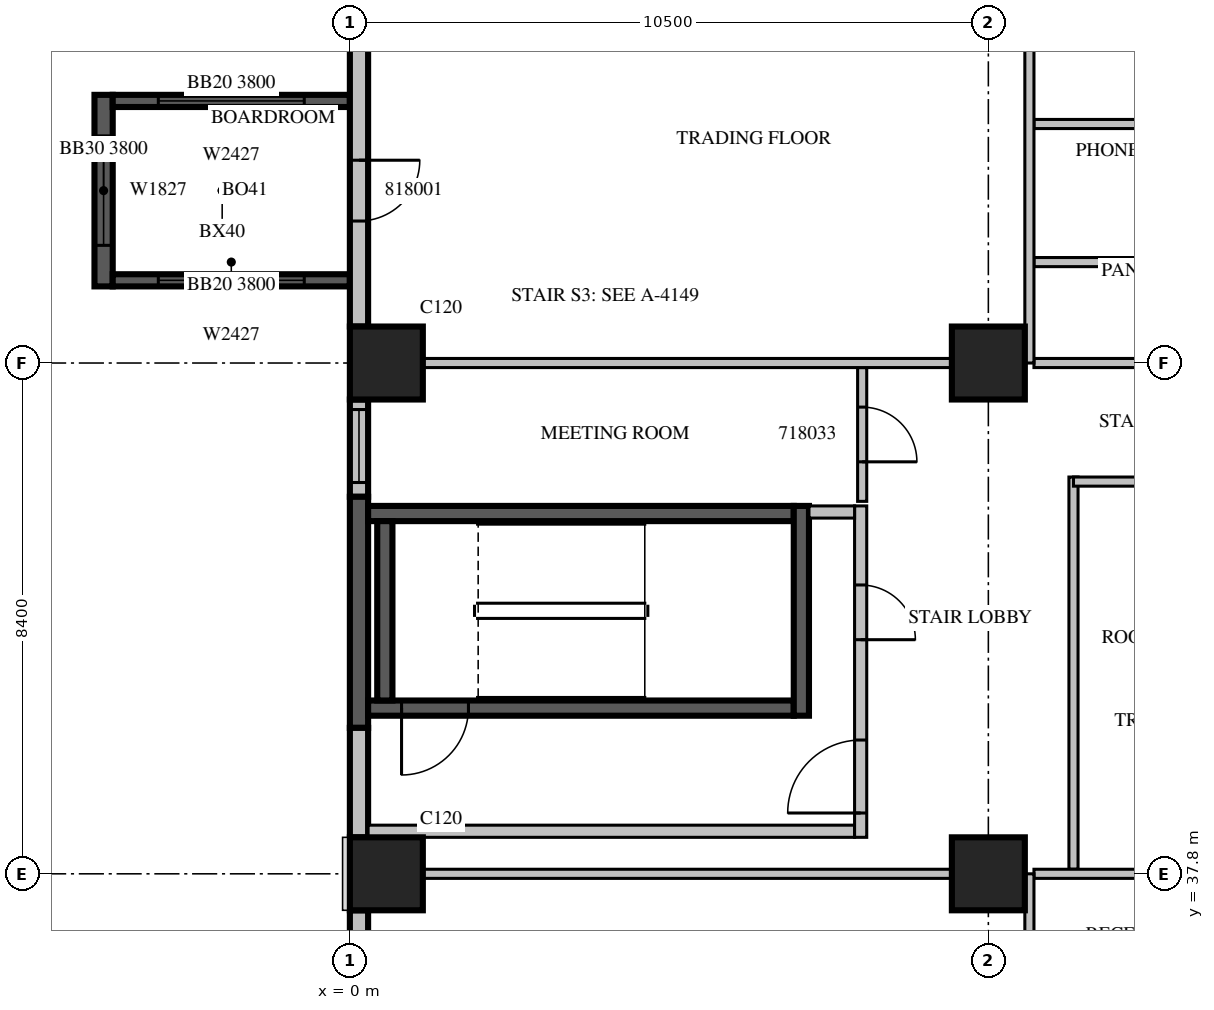
"""IFC4 building model, lengths in metres.
Left out: names, types, materials, properties, quantities, classifications, styles, units other than length and angle.
Written with IfcOpenShell. Run it as: python <this file> out.ifc"""

import sys

from ifc_helpers import new_model, si_unit, direction, frame, frame_2d, origin, origin_2d, place, context, subcontext, project, spatial, rectangle, extrude, source, transform, mapped, element, fill, save


model = new_model("IFC4")
c1 = context("Model", 3, precision=1e-05, world=origin(), true_north=direction((0.0, 1.0)))
c2 = subcontext(c1, "Body", "Model", "MODEL_VIEW")
j1 = project(units=[si_unit("LENGTHUNIT", "METRE"), si_unit("PLANEANGLEUNIT", "RADIAN")], contexts=[c1])
p1 = place(None, origin())
s1 = spatial("IfcSite", under=j1, at=p1, CompositionType="ELEMENT")
p2 = place(p1, origin())
s2 = spatial("IfcBuilding", under=s1, at=p2, CompositionType="ELEMENT")
p3 = place(p2, frame((0.0, 0.0, 86.7)))
s3 = spatial("IfcBuildingStorey", under=s2, at=p3, CompositionType="ELEMENT", Elevation=86.7)
m1 = source(origin(), c2, "Body", "SweptSolid", [
    extrude(rectangle(XDim=1.2, YDim=1.2, at=origin_2d()), origin(), (0.0, 0.0, 1.0), 4.2),
])
for number, where, z_axis, x_axis in (
    (1, (0.6, 37.8, 0.0), (0.0, 0.0, 1.0), (1.0, 0.0, 0.0)),
    (2, (10.5, 37.8, 0.0), (0.0, 0.0, 1.0), (1.0, 0.0, 0.0)),
    (3, (0.6, 46.2, 0.0), (0.0, 0.0, 1.0), (1.0, 0.0, 0.0)),
    (4, (10.5, 46.2, 0.0), (0.0, 0.0, 1.0), (1.0, 0.0, 0.0)),
):
    element("IfcColumn", number, at=place(p3, frame(where, z_axis=z_axis, x_axis=x_axis)), inside=s3, PredefinedType="COLUMN", context=c2, shape_type="MappedRepresentation", body=[
        mapped(m1, transform((0.0, 0.0, 0.0), scale=1.0)),
    ])
m2 = source(origin(), c2, "Body", "SweptSolid", [
    extrude(rectangle(XDim=3.15, YDim=0.3, at=frame_2d((1.575, 0.0))), origin(), (0.0, 0.0, 1.0), 3.8),
])
p4 = place(p3, frame((-4.05, 50.61, 0.0), z_axis=(0.0, 0.0, 1.0), x_axis=(0.0, -1.0, 0.0)))
e5 = element("IfcWall", 5, at=p4, inside=s3, PredefinedType="SOLIDWALL", context=c2, shape_type="MappedRepresentation", body=[
    mapped(m2, transform((0.0, 0.0, 0.0), scale=1.0)),
])
m3 = source(origin(), c2, "Body", "SweptSolid", [
    extrude(rectangle(XDim=1.8, YDim=2.7, at=frame_2d((0.9, 1.35))), frame((0.0, 0.16, 0.0), z_axis=(0.0, -1.0, 0.0), x_axis=(1.0, 0.0, 0.0)), (0.0, 0.0, 1.0), 0.32),
])
p5 = place(p4, frame((0.675, 0.0, 0.6)))
e6 = element("IfcOpeningElement", 6, at=p5, cuts=e5, PredefinedType="OPENING", context=c2, shape_type="MappedRepresentation", body=[
    mapped(m3, transform((0.0, 0.0, 0.0), scale=1.0)),
])
m4 = source(origin(), c2, "Body", "SweptSolid", [
    extrude(rectangle(XDim=3.9, YDim=0.2, at=frame_2d((1.95, 0.0))), origin(), (0.0, 0.0, 1.0), 3.8),
])
p6 = place(p3, frame((0.0, 50.51, 0.0), z_axis=(0.0, 0.0, 1.0), x_axis=(-1.0, 0.0, 0.0)))
e7 = element("IfcWall", 7, at=p6, inside=s3, PredefinedType="SOLIDWALL", context=c2, shape_type="MappedRepresentation", body=[
    mapped(m4, transform((0.0, 0.0, 0.0), scale=1.0)),
])
m5 = source(origin(), c2, "Body", "SweptSolid", [
    extrude(rectangle(XDim=2.4, YDim=2.7, at=frame_2d((1.2, 1.35))), frame((0.0, 0.11, 0.0), z_axis=(0.0, -1.0, 0.0), x_axis=(1.0, 0.0, 0.0)), (0.0, 0.0, 1.0), 0.22),
])
p7 = place(p6, frame((0.75, 0.0, 0.6)))
e8 = element("IfcOpeningElement", 8, at=p7, cuts=e7, PredefinedType="OPENING", context=c2, shape_type="MappedRepresentation", body=[
    mapped(m5, transform((0.0, 0.0, 0.0), scale=1.0)),
])
p8 = place(p3, frame((0.0, 47.56, 0.0), z_axis=(0.0, 0.0, 1.0), x_axis=(-1.0, 0.0, 0.0)))
e9 = element("IfcWall", 9, at=p8, inside=s3, PredefinedType="SOLIDWALL", context=c2, shape_type="MappedRepresentation", body=[
    mapped(m4, transform((0.0, 0.0, 0.0), scale=1.0)),
])
p9 = place(p8, frame((0.75, 0.0, 0.6)))
e10 = element("IfcOpeningElement", 10, at=p9, cuts=e9, PredefinedType="OPENING", context=c2, shape_type="MappedRepresentation", body=[
    mapped(m5, transform((0.0, 0.0, 0.0), scale=1.0)),
])
m6 = source(origin(), c2, "Body", "SweptSolid", [
    extrude(rectangle(XDim=4.68, YDim=0.3, at=frame_2d((2.34, 0.0))), origin(), (0.0, 0.0, 1.0), 3.8),
])
p10 = place(p3, frame((0.15, 51.48, 0.0), z_axis=(0.0, 0.0, 1.0), x_axis=(0.0, -1.0, 0.0)))
e11 = element("IfcWall", 11, at=p10, inside=s3, PredefinedType="STANDARD", context=c2, shape_type="MappedRepresentation", body=[
    mapped(m6, transform((0.0, 0.0, 0.0), scale=1.0)),
])
m7 = source(origin(), c2, "Body", "SweptSolid", [
    extrude(rectangle(XDim=1.0, YDim=2.1, at=frame_2d((0.5, 1.05))), frame((0.0, 0.16, 0.0), z_axis=(0.0, -1.0, 0.0), x_axis=(1.0, 0.0, 0.0)), (0.0, 0.0, 1.0), 0.32),
])
p11 = place(p10, frame((1.945, 0.0, 0.0)))
e12 = element("IfcOpeningElement", 12, at=p11, cuts=e11, PredefinedType="OPENING", context=c2, shape_type="MappedRepresentation", body=[
    mapped(m7, transform((0.0, 0.0, 0.0), scale=1.0)),
])
m8 = source(origin(), c2, "Body", "SweptSolid", [
    extrude(rectangle(XDim=1.6, YDim=0.3, at=frame_2d((0.8, 0.0))), origin(), (0.0, 0.0, 1.0), 3.8),
])
p12 = place(p3, frame((0.15, 45.6, 0.0), z_axis=(0.0, 0.0, 1.0), x_axis=(0.0, -1.0, 0.0)))
e13 = element("IfcWall", 13, at=p12, inside=s3, PredefinedType="STANDARD", context=c2, shape_type="MappedRepresentation", body=[
    mapped(m8, transform((0.0, 0.0, 0.0), scale=1.0)),
])
m9 = source(origin(), c2, "Body", "SweptSolid", [
    extrude(rectangle(XDim=1.2, YDim=2.7, at=frame_2d((0.6, 1.35))), frame((0.0, 0.16, 0.0), z_axis=(0.0, -1.0, 0.0), x_axis=(1.0, 0.0, 0.0)), (0.0, 0.0, 1.0), 0.32),
])
p13 = place(p12, frame((0.165, 0.0, 0.6)))
e14 = element("IfcOpeningElement", 14, at=p13, cuts=e13, PredefinedType="OPENING", context=c2, shape_type="MappedRepresentation", body=[
    mapped(m9, transform((0.0, 0.0, 0.0), scale=1.0)),
])
m10 = source(origin(), c2, "Body", "SweptSolid", [
    extrude(rectangle(XDim=3.8, YDim=0.3, at=frame_2d((1.9, 0.0))), origin(), (0.0, 0.0, 1.0), 3.8),
])
p14 = place(p3, frame((0.15, 44.0, 0.0), z_axis=(0.0, 0.0, 1.0), x_axis=(0.0, -1.0, 0.0)))
e15 = element("IfcWall", 15, at=p14, inside=s3, PredefinedType="SOLIDWALL", context=c2, shape_type="MappedRepresentation", body=[
    mapped(m10, transform((0.0, 0.0, 0.0), scale=1.0)),
])
m11 = source(origin(), c2, "Body", "SweptSolid", [
    extrude(rectangle(XDim=1.8, YDim=0.3, at=frame_2d((0.9, 0.0))), origin(), (0.0, 0.0, 1.0), 3.8),
])
p15 = place(p3, frame((0.15, 40.2, 0.0), z_axis=(0.0, 0.0, 1.0), x_axis=(0.0, -1.0, 0.0)))
e16 = element("IfcWall", 16, at=p15, inside=s3, PredefinedType="STANDARD", context=c2, shape_type="MappedRepresentation", body=[
    mapped(m11, transform((0.0, 0.0, 0.0), scale=1.0)),
])
m12 = source(origin(), c2, "Body", "SweptSolid", [
    extrude(rectangle(XDim=7.2, YDim=0.3, at=frame_2d((3.6, 0.0))), origin(), (0.0, 0.0, 1.0), 3.8),
])
p16 = place(p3, frame((0.15, 37.2, 0.0), z_axis=(0.0, 0.0, 1.0), x_axis=(0.0, -1.0, 0.0)))
e17 = element("IfcWall", 17, at=p16, inside=s3, PredefinedType="STANDARD", context=c2, shape_type="MappedRepresentation", body=[
    mapped(m12, transform((0.0, 0.0, 0.0), scale=1.0)),
])
p17 = place(p16, frame((1.008, 0.0, 0.6)))
e18 = element("IfcOpeningElement", 18, at=p17, cuts=e17, PredefinedType="OPENING", context=c2, shape_type="MappedRepresentation", body=[
    mapped(m3, transform((0.0, 0.0, 0.0), scale=1.0)),
])
m13 = source(origin(), c2, "Body", "SweptSolid", [
    extrude(rectangle(XDim=2.4, YDim=2.7, at=frame_2d((1.2, 1.35))), frame((0.0, 0.16, 0.0), z_axis=(0.0, -1.0, 0.0), x_axis=(1.0, 0.0, 0.0)), (0.0, 0.0, 1.0), 0.32),
])
p18 = place(p16, frame((3.804, 0.0, 0.6)))
e19 = element("IfcOpeningElement", 19, at=p18, cuts=e17, PredefinedType="OPENING", context=c2, shape_type="MappedRepresentation", body=[
    mapped(m13, transform((0.0, 0.0, 0.0), scale=1.0)),
])
m14 = source(origin(), c2, "Body", "SweptSolid", [
    extrude(rectangle(XDim=7.0, YDim=0.25, at=frame_2d((3.5, 0.0))), origin(), (0.0, 0.0, 1.0), 3.8),
])
p19 = place(p3, frame((0.3, 40.525, 0.0), z_axis=(0.0, 0.0, 1.0), x_axis=(1.0, 0.0, 0.0)))
e20 = element("IfcWall", 20, at=p19, inside=s3, PredefinedType="SOLIDWALL", context=c2, shape_type="MappedRepresentation", body=[
    mapped(m14, transform((0.0, 0.0, 0.0), scale=1.0)),
])
m15 = source(origin(), c2, "Body", "SweptSolid", [
    extrude(rectangle(XDim=1.1, YDim=2.1, at=frame_2d((0.55, 1.05))), frame((0.0, 0.135, 0.0), z_axis=(0.0, -1.0, 0.0), x_axis=(1.0, 0.0, 0.0)), (0.0, 0.0, 1.0), 0.27),
])
p20 = place(p19, frame((0.55, 0.0, 0.0)))
e21 = element("IfcOpeningElement", 21, at=p20, cuts=e20, PredefinedType="OPENING", context=c2, shape_type="MappedRepresentation", body=[
    mapped(m15, transform((0.0, 0.0, 0.0), scale=1.0)),
])
p21 = place(p3, frame((0.3, 43.725, 0.0), z_axis=(0.0, 0.0, 1.0), x_axis=(1.0, 0.0, 0.0)))
e22 = element("IfcWall", 22, at=p21, inside=s3, PredefinedType="SOLIDWALL", context=c2, shape_type="MappedRepresentation", body=[
    mapped(m14, transform((0.0, 0.0, 0.0), scale=1.0)),
])
m16 = source(origin(), c2, "Body", "SweptSolid", [
    extrude(rectangle(XDim=3.45, YDim=0.25, at=frame_2d((1.725, 0.0))), origin(), (0.0, 0.0, 1.0), 3.8),
])
p22 = place(p3, frame((7.425, 40.4, 0.0), z_axis=(0.0, 0.0, 1.0), x_axis=(0.0, 1.0, 0.0)))
e23 = element("IfcWall", 23, at=p22, inside=s3, PredefinedType="SOLIDWALL", context=c2, shape_type="MappedRepresentation", body=[
    mapped(m16, transform((0.0, 0.0, 0.0), scale=1.0)),
])
m17 = source(origin(), c2, "Body", "SweptSolid", [
    extrude(rectangle(XDim=2.95, YDim=0.25, at=frame_2d((1.475, 0.0))), origin(), (0.0, 0.0, 1.0), 3.8),
])
p23 = place(p3, frame((0.575, 40.65, 0.0), z_axis=(0.0, 0.0, 1.0), x_axis=(0.0, 1.0, 0.0)))
e24 = element("IfcWall", 24, at=p23, inside=s3, PredefinedType="SOLIDWALL", context=c2, shape_type="MappedRepresentation", body=[
    mapped(m17, transform((0.0, 0.0, 0.0), scale=1.0)),
])
m18 = source(origin(), c2, "Body", "SweptSolid", [
    extrude(rectangle(XDim=8.0, YDim=0.2, at=frame_2d((4.0, 0.0))), origin(), (0.0, 0.0, 1.0), 3.8),
])
p24 = place(p3, frame((0.3, 38.5, 0.0), z_axis=(0.0, 0.0, 1.0), x_axis=(1.0, 0.0, 0.0)))
e25 = element("IfcWall", 25, at=p24, inside=s3, PredefinedType="PARTITIONING", context=c2, shape_type="MappedRepresentation", body=[
    mapped(m18, transform((0.0, 0.0, 0.0), scale=1.0)),
])
m19 = source(origin(), c2, "Body", "SweptSolid", [
    extrude(rectangle(XDim=5.45, YDim=0.2, at=frame_2d((2.725, 0.0))), origin(), (0.0, 0.0, 1.0), 3.8),
])
p25 = place(p3, frame((8.4, 38.4, 0.0), z_axis=(0.0, 0.0, 1.0), x_axis=(0.0, 1.0, 0.0)))
e26 = element("IfcWall", 26, at=p25, inside=s3, PredefinedType="PARTITIONING", context=c2, shape_type="MappedRepresentation", body=[
    mapped(m19, transform((0.0, 0.0, 0.0), scale=1.0)),
])
m20 = source(origin(), c2, "Body", "SweptSolid", [
    extrude(rectangle(XDim=1.2, YDim=2.1, at=frame_2d((0.6, 1.05))), frame((0.0, 0.11, 0.0), z_axis=(0.0, -1.0, 0.0), x_axis=(1.0, 0.0, 0.0)), (0.0, 0.0, 1.0), 0.22),
])
p26 = place(p25, frame((0.4, 0.0, 0.0)))
e27 = element("IfcOpeningElement", 27, at=p26, cuts=e26, PredefinedType="OPENING", context=c2, shape_type="MappedRepresentation", body=[
    mapped(m20, transform((0.0, 0.0, 0.0), scale=1.0)),
])
m21 = source(origin(), c2, "Body", "SweptSolid", [
    extrude(rectangle(XDim=0.9, YDim=2.1, at=frame_2d((0.45, 1.05))), frame((0.0, 0.11, 0.0), z_axis=(0.0, -1.0, 0.0), x_axis=(1.0, 0.0, 0.0)), (0.0, 0.0, 1.0), 0.22),
])
p27 = place(p25, frame((3.25, 0.0, 0.0)))
e28 = element("IfcOpeningElement", 28, at=p27, cuts=e26, PredefinedType="OPENING", context=c2, shape_type="MappedRepresentation", body=[
    mapped(m21, transform((0.0, 0.0, 0.0), scale=1.0)),
])
m22 = source(origin(), c2, "Body", "SweptSolid", [
    extrude(rectangle(XDim=0.75, YDim=0.2, at=frame_2d((0.375, 0.0))), origin(), (0.0, 0.0, 1.0), 3.8),
])
p28 = place(p3, frame((7.55, 43.75, 0.0), z_axis=(0.0, 0.0, 1.0), x_axis=(1.0, 0.0, 0.0)))
e29 = element("IfcWall", 29, at=p28, inside=s3, PredefinedType="PARTITIONING", context=c2, shape_type="MappedRepresentation", body=[
    mapped(m22, transform((0.0, 0.0, 0.0), scale=1.0)),
])
m23 = source(origin(), c2, "Body", "SweptSolid", [
    extrude(rectangle(XDim=6.45, YDim=0.15, at=frame_2d((3.225, 0.0))), origin(), (0.0, 0.0, 1.0), 3.8),
])
p29 = place(p3, frame((11.9, 44.325, 0.0), z_axis=(0.0, 0.0, 1.0), x_axis=(0.0, -1.0, 0.0)))
e30 = element("IfcWall", 30, at=p29, inside=s3, PredefinedType="PARTITIONING", context=c2, shape_type="MappedRepresentation", body=[
    mapped(m23, transform((0.0, 0.0, 0.0), scale=1.0)),
])
m24 = source(origin(), c2, "Body", "SweptSolid", [
    extrude(rectangle(XDim=2.875, YDim=0.15, at=frame_2d((1.438, 0.0))), origin(), (0.0, 0.0, 1.0), 3.8),
])
p30 = place(p3, frame((14.775, 44.25, 0.0), z_axis=(0.0, 0.0, 1.0), x_axis=(-1.0, 0.0, 0.0)))
e31 = element("IfcWall", 31, at=p30, inside=s3, PredefinedType="PARTITIONING", context=c2, shape_type="MappedRepresentation", body=[
    mapped(m24, transform((0.0, 0.0, 0.0), scale=1.0)),
])
m25 = source(origin(), c2, "Body", "SweptSolid", [
    extrude(rectangle(XDim=2.2, YDim=0.15, at=frame_2d((1.1, 0.0))), origin(), (0.0, 0.0, 1.0), 3.8),
])
p31 = place(p3, frame((8.425, 43.925, 0.0), z_axis=(0.0, 0.0, 1.0), x_axis=(0.0, 1.0, 0.0)))
e32 = element("IfcWall", 32, at=p31, inside=s3, PredefinedType="PARTITIONING", context=c2, shape_type="MappedRepresentation", body=[
    mapped(m25, transform((0.0, 0.0, 0.0), scale=1.0)),
])
m26 = source(origin(), c2, "Body", "SweptSolid", [
    extrude(rectangle(XDim=0.9, YDim=2.1, at=frame_2d((0.45, 1.05))), frame((0.0, 0.085, 0.0), z_axis=(0.0, -1.0, 0.0), x_axis=(1.0, 0.0, 0.0)), (0.0, 0.0, 1.0), 0.17),
])
p32 = place(p31, frame((0.65, 0.0, 0.0)))
e33 = element("IfcOpeningElement", 33, at=p32, cuts=e32, PredefinedType="OPENING", context=c2, shape_type="MappedRepresentation", body=[
    mapped(m26, transform((0.0, 0.0, 0.0), scale=1.0)),
])
m27 = source(origin(), c2, "Body", "SweptSolid", [
    extrude(rectangle(XDim=8.702, YDim=0.15, at=frame_2d((4.351, 0.0))), origin(), (0.0, 0.0, 1.0), 3.8),
])
p33 = place(p3, frame((9.901, 37.8, 0.0), z_axis=(0.0, 0.0, 1.0), x_axis=(-1.0, 0.0, 0.0)))
e34 = element("IfcWall", 34, at=p33, inside=s3, PredefinedType="PARTITIONING", context=c2, shape_type="MappedRepresentation", body=[
    mapped(m27, transform((0.0, 0.0, 0.0), scale=1.0)),
])
m28 = source(origin(), c2, "Body", "SweptSolid", [
    extrude(rectangle(XDim=3.45, YDim=0.15, at=frame_2d((1.725, 0.0))), origin(), (0.0, 0.0, 1.0), 3.8),
])
p34 = place(p3, frame((14.7, 37.8, 0.0), z_axis=(0.0, 0.0, 1.0), x_axis=(-1.0, 0.0, 0.0)))
e35 = element("IfcWall", 35, at=p34, inside=s3, PredefinedType="PARTITIONING", context=c2, shape_type="MappedRepresentation", body=[
    mapped(m28, transform((0.0, 0.0, 0.0), scale=1.0)),
])
m29 = source(origin(), c2, "Body", "SweptSolid", [
    extrude(rectangle(XDim=8.4, YDim=0.15, at=frame_2d((4.2, 0.0))), origin(), (0.0, 0.0, 1.0), 3.3),
])
p35 = place(p3, frame((11.175, 29.4, 0.0), z_axis=(0.0, 0.0, 1.0), x_axis=(0.0, 1.0, 0.0)))
e36 = element("IfcWall", 36, at=p35, inside=s3, PredefinedType="PARTITIONING", context=c2, shape_type="MappedRepresentation", body=[
    mapped(m29, transform((0.0, 0.0, 0.0), scale=1.0)),
])
m30 = source(origin(), c2, "Body", "SweptSolid", [
    extrude(rectangle(XDim=1.1, YDim=2.1, at=frame_2d((0.55, 1.05))), frame((0.0, 0.085, 0.0), z_axis=(0.0, -1.0, 0.0), x_axis=(1.0, 0.0, 0.0)), (0.0, 0.0, 1.0), 0.17),
])
p36 = place(p35, frame((5.883, 0.0, 0.0)))
e37 = element("IfcOpeningElement", 37, at=p36, cuts=e36, PredefinedType="OPENING", context=c2, shape_type="MappedRepresentation", body=[
    mapped(m30, transform((0.0, 0.0, 0.0), scale=1.0)),
])
for number, where, z_axis, x_axis in (
    (38, (14.7, 47.86, 0.0), (0.0, 0.0, 1.0), (-1.0, 0.0, 0.0)),
    (39, (14.7, 50.131, 0.0), (0.0, 0.0, 1.0), (-1.0, 0.0, 0.0)),
):
    element("IfcWall", number, at=place(p3, frame(where, z_axis=z_axis, x_axis=x_axis)), inside=s3, PredefinedType="PARTITIONING", context=c2, shape_type="MappedRepresentation", body=[
        mapped(m28, transform((0.0, 0.0, 0.0), scale=1.0)),
    ])
p37 = place(p3, frame((9.901, 46.2, 0.0), z_axis=(0.0, 0.0, 1.0), x_axis=(-1.0, 0.0, 0.0)))
e40 = element("IfcWall", 40, at=p37, inside=s3, PredefinedType="PARTITIONING", context=c2, shape_type="MappedRepresentation", body=[
    mapped(m27, transform((0.0, 0.0, 0.0), scale=1.0)),
])
p38 = place(p3, frame((14.7, 46.2, 0.0), z_axis=(0.0, 0.0, 1.0), x_axis=(-1.0, 0.0, 0.0)))
e41 = element("IfcWall", 41, at=p38, inside=s3, PredefinedType="PARTITIONING", context=c2, shape_type="MappedRepresentation", body=[
    mapped(m28, transform((0.0, 0.0, 0.0), scale=1.0)),
])
p39 = place(p3, frame((11.175, 46.2, 0.0), z_axis=(0.0, 0.0, 1.0), x_axis=(0.0, 1.0, 0.0)))
e42 = element("IfcWall", 42, at=p39, inside=s3, PredefinedType="PARTITIONING", context=c2, shape_type="SweptSolid", body=[
    extrude(rectangle(XDim=13.14, YDim=0.15, at=frame_2d((6.57, 0.0))), origin(), (0.0, 0.0, 1.0), 3.8),
])
m31 = source(origin(), c2, "Body", "SweptSolid", [
    extrude(rectangle(XDim=1.0, YDim=2.1, at=frame_2d((0.5, 1.05))), frame((0.0, 0.085, 0.0), z_axis=(0.0, -1.0, 0.0), x_axis=(1.0, 0.0, 0.0)), (0.0, 0.0, 1.0), 0.17),
])
p40 = place(p39, frame((10.024, 0.0, 0.0)))
e43 = element("IfcOpeningElement", 43, at=p40, cuts=e42, PredefinedType="OPENING", context=c2, shape_type="MappedRepresentation", body=[
    mapped(m31, transform((0.0, 0.0, 0.0), scale=1.0)),
])
m32 = source(origin(), c2, "Body", "SweptSolid", [
    extrude(rectangle(XDim=1.8, YDim=2.7, at=frame_2d((0.9, 1.35))), frame((0.0, 0.03, 0.0), z_axis=(0.0, -1.0, 0.0), x_axis=(1.0, 0.0, 0.0)), (0.0, 0.0, 1.0), 0.06),
])
p41 = place(p5, origin())
e44 = element("IfcWindow", 44, at=p41, inside=s3, PartitioningType="SINGLE_PANEL", PredefinedType="WINDOW", context=c2, shape_type="MappedRepresentation", body=[
    mapped(m32, transform((0.0, 0.0, 0.0), scale=1.0)),
])
fill(e6, e44)
m33 = source(origin(), c2, "Body", "SweptSolid", [
    extrude(rectangle(XDim=2.4, YDim=2.7, at=frame_2d((1.2, 1.35))), frame((0.0, 0.03, 0.0), z_axis=(0.0, -1.0, 0.0), x_axis=(1.0, 0.0, 0.0)), (0.0, 0.0, 1.0), 0.06),
])
p42 = place(p7, origin())
e45 = element("IfcWindow", 45, at=p42, inside=s3, PartitioningType="SINGLE_PANEL", PredefinedType="WINDOW", context=c2, shape_type="MappedRepresentation", body=[
    mapped(m33, transform((0.0, 0.0, 0.0), scale=1.0)),
])
fill(e8, e45)
p43 = place(p9, origin())
e46 = element("IfcWindow", 46, at=p43, inside=s3, PartitioningType="SINGLE_PANEL", PredefinedType="WINDOW", context=c2, shape_type="MappedRepresentation", body=[
    mapped(m33, transform((0.0, 0.0, 0.0), scale=1.0)),
])
fill(e10, e46)
m34 = source(origin(), c2, "Body", "SweptSolid", [
    extrude(rectangle(XDim=1.2, YDim=2.7, at=frame_2d((0.6, 1.35))), frame((0.0, 0.03, 0.0), z_axis=(0.0, -1.0, 0.0), x_axis=(1.0, 0.0, 0.0)), (0.0, 0.0, 1.0), 0.06),
])
p44 = place(p13, origin())
e47 = element("IfcWindow", 47, at=p44, inside=s3, PartitioningType="SINGLE_PANEL", PredefinedType="WINDOW", context=c2, shape_type="MappedRepresentation", body=[
    mapped(m34, transform((0.0, 0.0, 0.0), scale=1.0)),
])
fill(e14, e47)
m35 = source(origin(), c2, "Body", "SweptSolid", [
    extrude(rectangle(XDim=1.1, YDim=2.1, at=frame_2d((0.55, 1.05))), frame((0.0, 0.025, 0.0), z_axis=(0.0, -1.0, 0.0), x_axis=(1.0, 0.0, 0.0)), (0.0, 0.0, 1.0), 0.05),
])
p45 = place(p20, origin())
e48 = element("IfcDoor", 48, at=p45, inside=s3, OperationType="SINGLE_SWING_RIGHT", PredefinedType="DOOR", context=c2, shape_type="MappedRepresentation", body=[
    mapped(m35, transform((0.0, 0.0, 0.0), scale=1.0)),
])
fill(e21, e48)
m36 = source(origin(), c2, "Body", "SweptSolid", [
    extrude(rectangle(XDim=1.2, YDim=2.1, at=frame_2d((0.6, 1.05))), frame((0.0, 0.025, 0.0), z_axis=(0.0, -1.0, 0.0), x_axis=(1.0, 0.0, 0.0)), (0.0, 0.0, 1.0), 0.05),
])
p46 = place(p26, origin())
e49 = element("IfcDoor", 49, at=p46, inside=s3, OperationType="SINGLE_SWING_LEFT", PredefinedType="DOOR", context=c2, shape_type="MappedRepresentation", body=[
    mapped(m36, transform((0.0, 0.0, 0.0), scale=1.0)),
])
fill(e27, e49)
m37 = source(origin(), c2, "Body", "SweptSolid", [
    extrude(rectangle(XDim=0.9, YDim=2.1, at=frame_2d((0.45, 1.05))), frame((0.0, 0.025, 0.0), z_axis=(0.0, -1.0, 0.0), x_axis=(1.0, 0.0, 0.0)), (0.0, 0.0, 1.0), 0.05),
])
p47 = place(p27, origin())
e50 = element("IfcDoor", 50, at=p47, inside=s3, OperationType="SINGLE_SWING_RIGHT", PredefinedType="DOOR", context=c2, shape_type="MappedRepresentation", body=[
    mapped(m37, transform((0.0, 0.0, 0.0), scale=1.0)),
])
fill(e28, e50)
p48 = place(p32, origin())
e51 = element("IfcDoor", 51, at=p48, inside=s3, OperationType="SINGLE_SWING_RIGHT", PredefinedType="DOOR", context=c2, shape_type="MappedRepresentation", body=[
    mapped(m37, transform((0.0, 0.0, 0.0), scale=1.0)),
])
fill(e33, e51)
m38 = source(origin(), c2, "Body", "SweptSolid", [
    extrude(rectangle(XDim=1.0, YDim=2.1, at=frame_2d((0.5, 1.05))), frame((0.0, 0.025, 0.0), z_axis=(0.0, -1.0, 0.0), x_axis=(1.0, 0.0, 0.0)), (0.0, 0.0, 1.0), 0.05),
])
p49 = place(p11, origin())
e52 = element("IfcDoor", 52, at=p49, inside=s3, OperationType="SINGLE_SWING_LEFT", PredefinedType="DOOR", context=c2, shape_type="MappedRepresentation", body=[
    mapped(m38, transform((0.0, 0.0, 0.0), scale=1.0)),
])
fill(e12, e52)
save(model, sys.argv[1])
